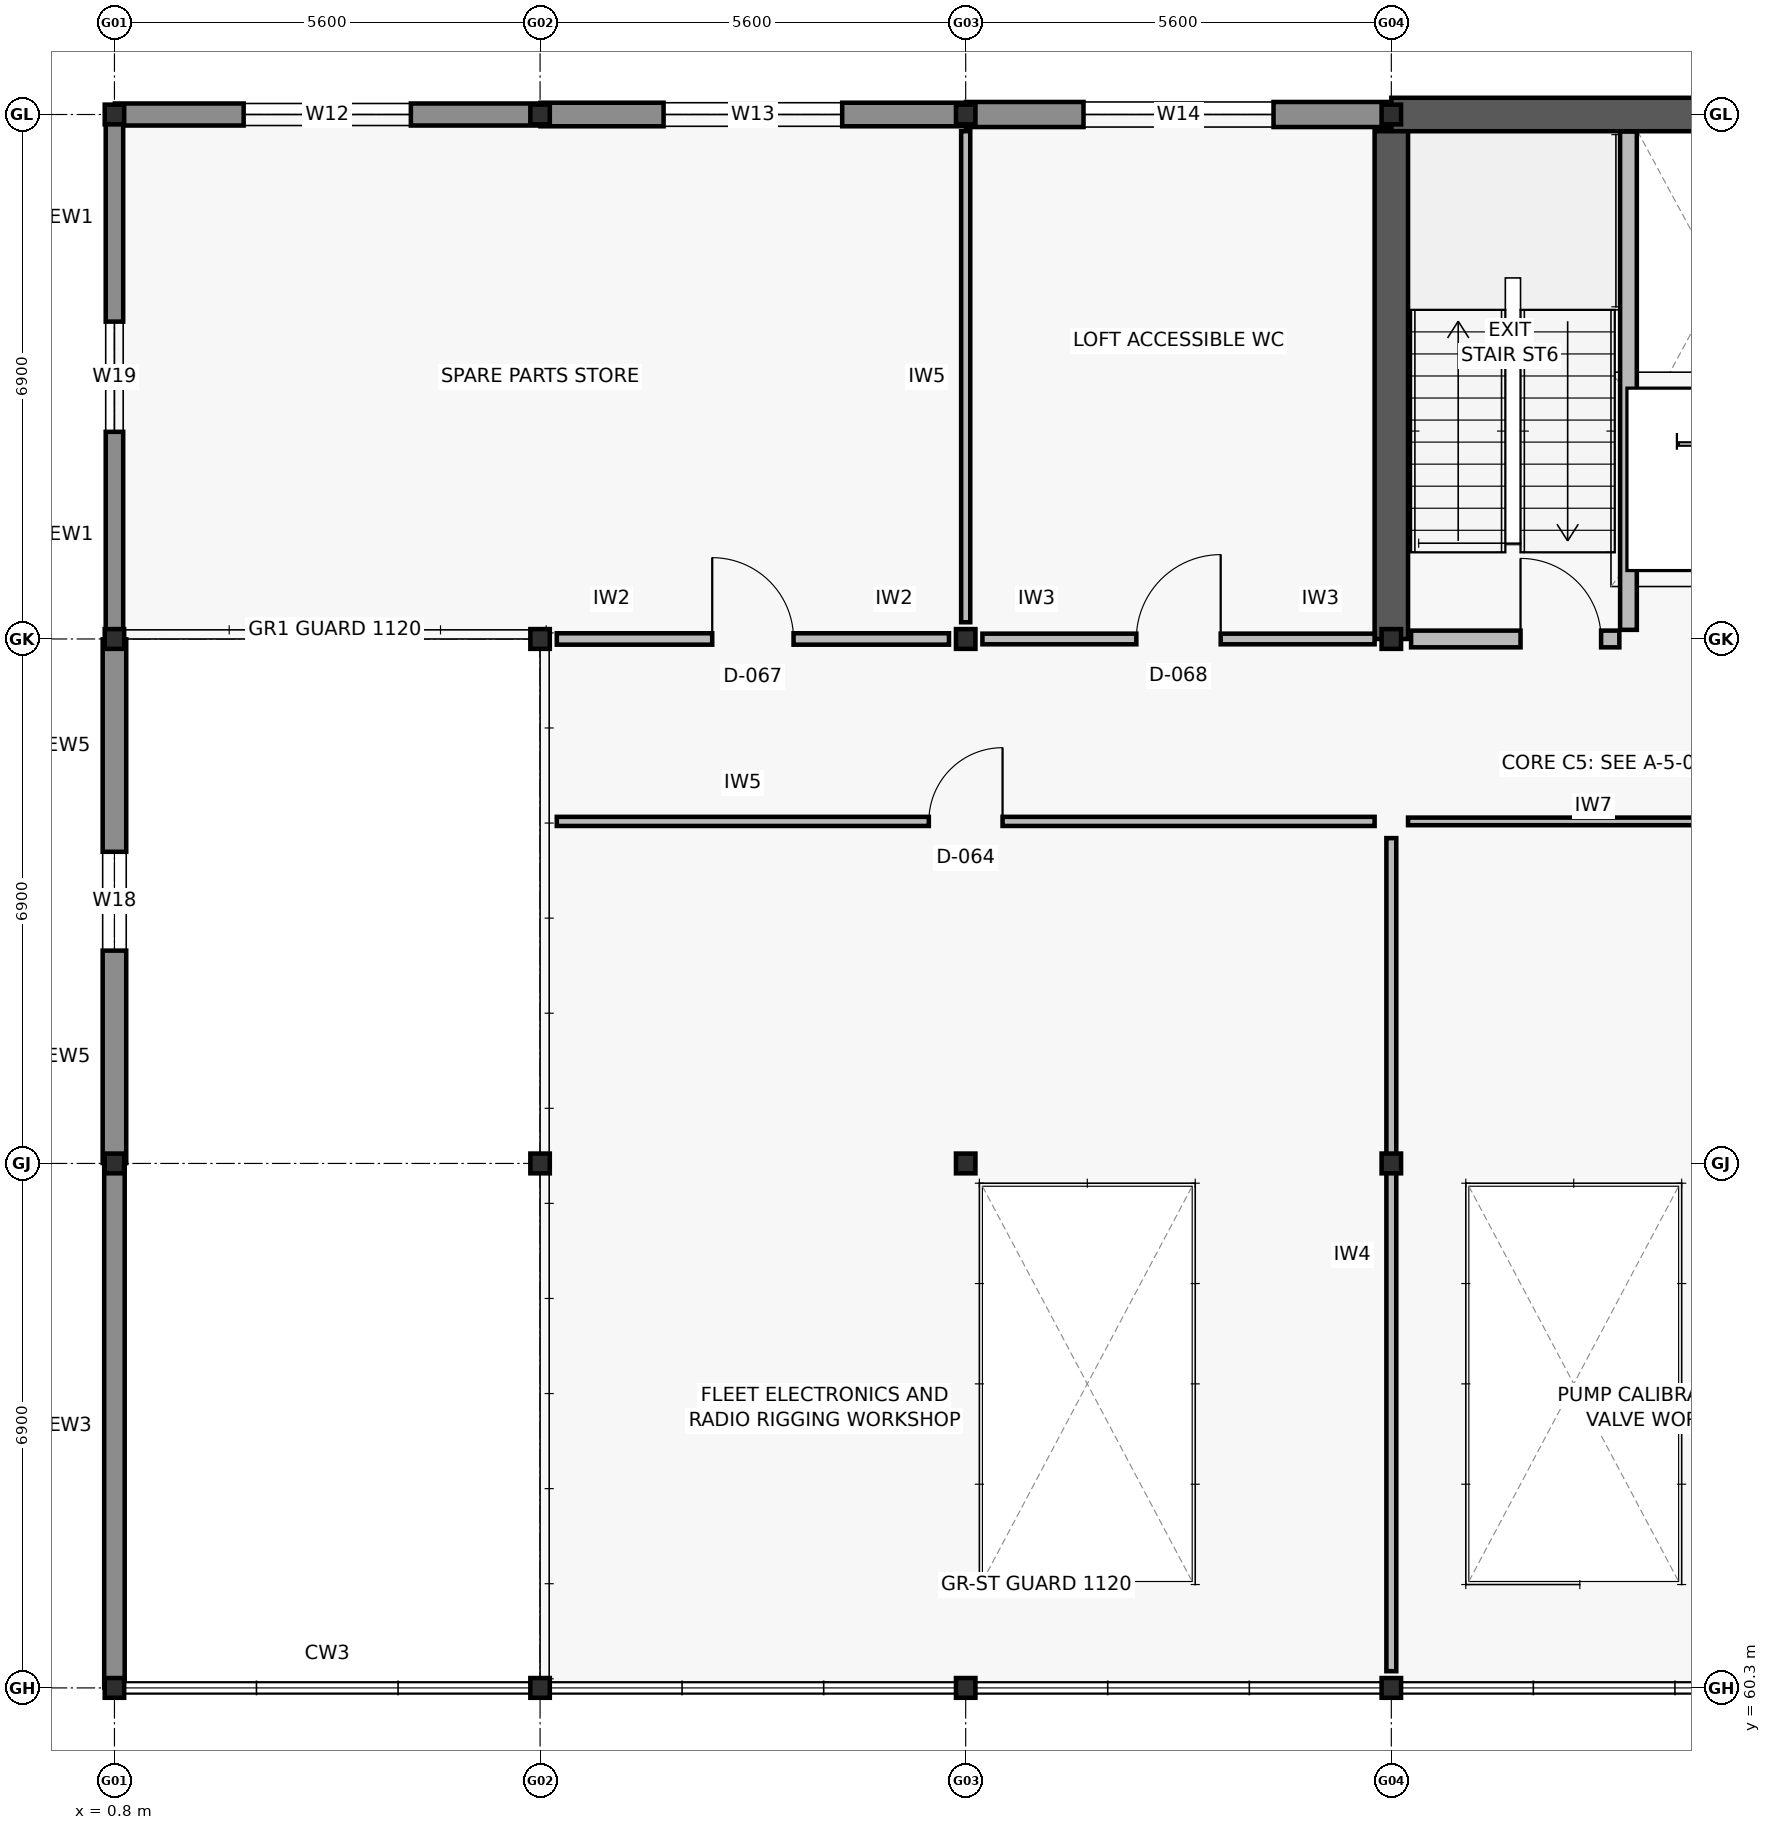
"""IFC4 building model, lengths in metres.
Left out: names, types, materials, properties, quantities, classifications, styles, units other than length and angle.
Written with IfcOpenShell. Run it as: python <this file> out.ifc"""

import sys

from ifc_helpers import new_model, si_unit, direction, frame, frame_2d, origin, origin_2d, place, context, subcontext, project, spatial, rectangle, i_section, extrude, element, fill, save


model = new_model("IFC4")
c1 = context("Model", 3, precision=1e-05, world=origin(), true_north=direction((0.0, 1.0)))
c2 = subcontext(c1, "Body", "Model", "MODEL_VIEW")
j1 = project(units=[si_unit("LENGTHUNIT", "METRE"), si_unit("PLANEANGLEUNIT", "RADIAN")], contexts=[c1])
p1 = place(None, origin())
s1 = spatial("IfcSite", under=j1, at=p1, CompositionType="ELEMENT")
p2 = place(p1, origin())
s2 = spatial("IfcBuilding", under=s1, at=p2, CompositionType="ELEMENT")
p3 = place(p2, frame((0.0, 0.0, 5.4)))
s3 = spatial("IfcBuildingStorey", under=s2, at=p3, CompositionType="ELEMENT", Elevation=5.4)
for number, where, z_axis, x_axis in (
    (1, (0.8, 60.3, 0.0), (0.0, 0.0, 1.0), (1.0, 0.0, 0.0)),
    (2, (0.8, 67.2, 0.0), (0.0, 0.0, 1.0), (1.0, 0.0, 0.0)),
    (3, (0.8, 74.1, 0.0), (0.0, 0.0, 1.0), (1.0, 0.0, 0.0)),
    (4, (0.8, 81.0, 0.0), (0.0, 0.0, 1.0), (1.0, 0.0, 0.0)),
    (5, (6.4, 60.3, 0.0), (0.0, 0.0, 1.0), (1.0, 0.0, 0.0)),
    (6, (6.4, 67.2, 0.0), (0.0, 0.0, 1.0), (1.0, 0.0, 0.0)),
    (7, (6.4, 74.1, 0.0), (0.0, 0.0, 1.0), (1.0, 0.0, 0.0)),
    (8, (6.4, 81.0, 0.0), (0.0, 0.0, 1.0), (1.0, 0.0, 0.0)),
    (9, (12.0, 60.3, 0.0), (0.0, 0.0, 1.0), (1.0, 0.0, 0.0)),
    (10, (12.0, 67.2, 0.0), (0.0, 0.0, 1.0), (1.0, 0.0, 0.0)),
    (11, (12.0, 74.1, 0.0), (0.0, 0.0, 1.0), (1.0, 0.0, 0.0)),
    (12, (12.0, 81.0, 0.0), (0.0, 0.0, 1.0), (1.0, 0.0, 0.0)),
    (13, (17.6, 60.3, 0.0), (0.0, 0.0, 1.0), (1.0, 0.0, 0.0)),
    (14, (17.6, 67.2, 0.0), (0.0, 0.0, 1.0), (1.0, 0.0, 0.0)),
    (15, (17.6, 74.1, 0.0), (0.0, 0.0, 1.0), (1.0, 0.0, 0.0)),
    (16, (17.6, 81.0, 0.0), (0.0, 0.0, 1.0), (1.0, 0.0, 0.0)),
):
    element("IfcColumn", number, at=place(p3, frame(where, z_axis=z_axis, x_axis=x_axis)), inside=s3, PredefinedType="COLUMN", context=c2, shape_type="SweptSolid", body=[
        extrude(i_section(OverallWidth=0.256, OverallDepth=0.26, WebThickness=0.01, FlangeThickness=0.017, FilletRadius=0.013, at=origin_2d()), origin(), (0.0, 0.0, 1.0), 4.2),
    ])
p4 = place(p3, frame((17.6, 81.0, 0.0), z_axis=(0.0, 0.0, 1.0), x_axis=(1.0, 0.0, 0.0)))
e17 = element("IfcWall", 17, at=p4, inside=s3, PredefinedType="SHEAR", context=c2, shape_type="SweptSolid", body=[
    extrude(rectangle(XDim=5.6, YDim=0.44, at=frame_2d((2.8, 0.0))), origin(), (0.0, 0.0, 1.0), 3.96),
])
p5 = place(p3, frame((17.6, 74.1, 0.0), z_axis=(0.0, 0.0, 1.0), x_axis=(0.0, 1.0, 0.0)))
e18 = element("IfcWall", 18, at=p5, inside=s3, PredefinedType="SHEAR", context=c2, shape_type="SweptSolid", body=[
    extrude(rectangle(XDim=6.68, YDim=0.44, at=frame_2d((3.34, 0.0))), origin(), (0.0, 0.0, 1.0), 3.96),
])
p6 = place(p3, frame((0.805, 81.0, 0.0), z_axis=(0.0, 0.0, 1.0), x_axis=(1.0, 0.0, 0.0)))
e19 = element("IfcWall", 19, at=p6, inside=s3, PredefinedType="SOLIDWALL", context=c2, shape_type="SweptSolid", body=[
    extrude(rectangle(XDim=5.59, YDim=0.29, at=frame_2d((2.795, 0.0))), origin(), (0.0, 0.0, 1.0), 3.32),
])
p7 = place(p6, frame((1.695, 0.0, 0.8)))
e20 = element("IfcOpeningElement", 20, at=p7, cuts=e19, PredefinedType="OPENING", context=c2, shape_type="SweptSolid", body=[
    extrude(rectangle(XDim=2.2, YDim=1.8, at=frame_2d((1.1, 0.9))), frame((0.0, 0.155, 0.0), z_axis=(0.0, -1.0, 0.0), x_axis=(1.0, 0.0, 0.0)), (0.0, 0.0, 1.0), 0.31),
])
p8 = place(p3, frame((6.405, 81.0, 0.0), z_axis=(0.0, 0.0, 1.0), x_axis=(1.0, 0.0, 0.0)))
e21 = element("IfcWall", 21, at=p8, inside=s3, PredefinedType="SOLIDWALL", context=c2, shape_type="SweptSolid", body=[
    extrude(rectangle(XDim=5.59, YDim=0.31, at=frame_2d((2.795, 0.0))), origin(), (0.0, 0.0, 1.0), 3.32),
])
p9 = place(p8, frame((1.62, 0.0, 0.8)))
e22 = element("IfcOpeningElement", 22, at=p9, cuts=e21, PredefinedType="OPENING", context=c2, shape_type="SweptSolid", body=[
    extrude(rectangle(XDim=2.35, YDim=1.8, at=frame_2d((1.175, 0.9))), frame((0.0, 0.165, 0.0), z_axis=(0.0, -1.0, 0.0), x_axis=(1.0, 0.0, 0.0)), (0.0, 0.0, 1.0), 0.33),
])
p10 = place(p3, frame((12.005, 81.0, 0.0), z_axis=(0.0, 0.0, 1.0), x_axis=(1.0, 0.0, 0.0)))
e23 = element("IfcWall", 23, at=p10, inside=s3, PredefinedType="SOLIDWALL", context=c2, shape_type="SweptSolid", body=[
    extrude(rectangle(XDim=5.59, YDim=0.33, at=frame_2d((2.795, 0.0))), origin(), (0.0, 0.0, 1.0), 3.32),
])
p11 = place(p10, frame((1.545, 0.0, 0.8)))
e24 = element("IfcOpeningElement", 24, at=p11, cuts=e23, PredefinedType="OPENING", context=c2, shape_type="SweptSolid", body=[
    extrude(rectangle(XDim=2.5, YDim=1.8, at=frame_2d((1.25, 0.9))), frame((0.0, 0.175, 0.0), z_axis=(0.0, -1.0, 0.0), x_axis=(1.0, 0.0, 0.0)), (0.0, 0.0, 1.0), 0.35),
])
p12 = place(p3, frame((0.8, 60.305, 0.0), z_axis=(0.0, 0.0, 1.0), x_axis=(0.0, 1.0, 0.0)))
e25 = element("IfcWall", 25, at=p12, inside=s3, PredefinedType="SOLIDWALL", context=c2, shape_type="SweptSolid", body=[
    extrude(rectangle(XDim=6.89, YDim=0.27, at=frame_2d((3.445, 0.0))), origin(), (0.0, 0.0, 1.0), 3.32),
])
p13 = place(p3, frame((0.8, 67.205, 0.0), z_axis=(0.0, 0.0, 1.0), x_axis=(0.0, 1.0, 0.0)))
e26 = element("IfcWall", 26, at=p13, inside=s3, PredefinedType="SOLIDWALL", context=c2, shape_type="SweptSolid", body=[
    extrude(rectangle(XDim=6.89, YDim=0.31, at=frame_2d((3.445, 0.0))), origin(), (0.0, 0.0, 1.0), 3.32),
])
p14 = place(p13, frame((2.795, 0.0, 0.8)))
e27 = element("IfcOpeningElement", 27, at=p14, cuts=e26, PredefinedType="OPENING", context=c2, shape_type="SweptSolid", body=[
    extrude(rectangle(XDim=1.3, YDim=1.8, at=frame_2d((0.65, 0.9))), frame((0.0, 0.165, 0.0), z_axis=(0.0, -1.0, 0.0), x_axis=(1.0, 0.0, 0.0)), (0.0, 0.0, 1.0), 0.33),
])
p15 = place(p3, frame((0.8, 74.105, 0.0), z_axis=(0.0, 0.0, 1.0), x_axis=(0.0, 1.0, 0.0)))
e28 = element("IfcWall", 28, at=p15, inside=s3, PredefinedType="SOLIDWALL", context=c2, shape_type="SweptSolid", body=[
    extrude(rectangle(XDim=6.89, YDim=0.23, at=frame_2d((3.445, 0.0))), origin(), (0.0, 0.0, 1.0), 3.32),
])
p16 = place(p15, frame((2.72, 0.0, 0.8)))
e29 = element("IfcOpeningElement", 29, at=p16, cuts=e28, PredefinedType="OPENING", context=c2, shape_type="SweptSolid", body=[
    extrude(rectangle(XDim=1.45, YDim=1.8, at=frame_2d((0.725, 0.9))), frame((0.0, 0.125, 0.0), z_axis=(0.0, -1.0, 0.0), x_axis=(1.0, 0.0, 0.0)), (0.0, 0.0, 1.0), 0.25),
])
p17 = place(p3, frame((20.72, 74.22, 0.0), z_axis=(0.0, 0.0, 1.0), x_axis=(0.0, 1.0, 0.0)))
e30 = element("IfcWall", 30, at=p17, inside=s3, PredefinedType="SOLIDWALL", context=c2, shape_type="SweptSolid", body=[
    extrude(rectangle(XDim=6.555, YDim=0.22, at=frame_2d((3.277, 0.0))), origin(), (0.0, 0.0, 1.0), 3.96),
])
p18 = place(p3, frame((17.86, 74.1, 0.0), z_axis=(0.0, 0.0, 1.0), x_axis=(1.0, 0.0, 0.0)))
e31 = element("IfcWall", 31, at=p18, inside=s3, PredefinedType="SOLIDWALL", context=c2, shape_type="SweptSolid", body=[
    extrude(rectangle(XDim=2.74, YDim=0.22, at=frame_2d((1.37, 0.0))), origin(), (0.0, 0.0, 1.0), 3.32),
])
p19 = place(p18, frame((1.44, 0.0, 0.0)))
e32 = element("IfcOpeningElement", 32, at=p19, cuts=e31, PredefinedType="OPENING", context=c2, shape_type="SweptSolid", body=[
    extrude(rectangle(XDim=1.06, YDim=2.1, at=frame_2d((0.53, 1.05))), frame((0.0, 0.12, 0.0), z_axis=(0.0, -1.0, 0.0), x_axis=(1.0, 0.0, 0.0)), (0.0, 0.0, 1.0), 0.24),
])
p20 = place(p3, frame((20.84, 76.7, 0.0), z_axis=(0.0, 0.0, 1.0), x_axis=(1.0, 0.0, 0.0)))
e33 = element("IfcWall", 33, at=p20, inside=s3, PredefinedType="SOLIDWALL", context=c2, shape_type="SweptSolid", body=[
    extrude(rectangle(XDim=2.135, YDim=0.22, at=frame_2d((1.067, 0.0))), origin(), (0.0, 0.0, 1.0), 3.96),
])
p21 = place(p20, frame((0.518, 0.0, 0.0)))
e34 = element("IfcOpeningElement", 34, at=p21, cuts=e33, PredefinedType="OPENING", context=c2, shape_type="SweptSolid", body=[
    extrude(rectangle(XDim=1.1, YDim=2.1, at=frame_2d((0.55, 1.05))), frame((0.0, 0.12, 0.0), z_axis=(0.0, -1.0, 0.0), x_axis=(1.0, 0.0, 0.0)), (0.0, 0.0, 1.0), 0.24),
])
p22 = place(p3, frame((17.6, 60.52, 0.0), z_axis=(0.0, 0.0, 1.0), x_axis=(0.0, 1.0, 0.0)))
e35 = element("IfcWall", 35, at=p22, inside=s3, PredefinedType="PARTITIONING", context=c2, shape_type="SweptSolid", body=[
    extrude(rectangle(XDim=10.96, YDim=0.13, at=frame_2d((5.48, 0.0))), origin(), (0.0, 0.0, 1.0), 3.3),
])
p23 = place(p3, frame((6.62, 71.7, 0.0), z_axis=(0.0, 0.0, 1.0), x_axis=(1.0, 0.0, 0.0)))
e36 = element("IfcWall", 36, at=p23, inside=s3, PredefinedType="PARTITIONING", context=c2, shape_type="SweptSolid", body=[
    extrude(rectangle(XDim=10.76, YDim=0.12, at=frame_2d((5.38, 0.0))), origin(), (0.0, 0.0, 1.0), 3.3),
])
p24 = place(p23, frame((4.895, 0.0, 0.0)))
e37 = element("IfcOpeningElement", 37, at=p24, cuts=e36, PredefinedType="OPENING", context=c2, shape_type="SweptSolid", body=[
    extrude(rectangle(XDim=0.97, YDim=2.1, at=frame_2d((0.485, 1.05))), frame((0.0, 0.07, 0.0), z_axis=(0.0, -1.0, 0.0), x_axis=(1.0, 0.0, 0.0)), (0.0, 0.0, 1.0), 0.14),
])
p25 = place(p3, frame((17.82, 71.7, 0.0), z_axis=(0.0, 0.0, 1.0), x_axis=(1.0, 0.0, 0.0)))
e38 = element("IfcWall", 38, at=p25, inside=s3, PredefinedType="PARTITIONING", context=c2, shape_type="SweptSolid", body=[
    extrude(rectangle(XDim=10.76, YDim=0.1, at=frame_2d((5.38, 0.0))), origin(), (0.0, 0.0, 1.0), 3.3),
])
p26 = place(p25, frame((4.88, 0.0, 0.0)))
e39 = element("IfcOpeningElement", 39, at=p26, cuts=e38, PredefinedType="OPENING", context=c2, shape_type="SweptSolid", body=[
    extrude(rectangle(XDim=1.0, YDim=2.12, at=frame_2d((0.5, 1.06))), frame((0.0, 0.06, 0.0), z_axis=(0.0, -1.0, 0.0), x_axis=(1.0, 0.0, 0.0)), (0.0, 0.0, 1.0), 0.12),
])
p27 = place(p3, frame((6.62, 74.1, 0.0), z_axis=(0.0, 0.0, 1.0), x_axis=(1.0, 0.0, 0.0)))
e40 = element("IfcWall", 40, at=p27, inside=s3, PredefinedType="PARTITIONING", context=c2, shape_type="SweptSolid", body=[
    extrude(rectangle(XDim=5.16, YDim=0.15, at=frame_2d((2.58, 0.0))), origin(), (0.0, 0.0, 1.0), 3.3),
])
p28 = place(p27, frame((2.045, 0.0, 0.0)))
e41 = element("IfcOpeningElement", 41, at=p28, cuts=e40, PredefinedType="OPENING", context=c2, shape_type="SweptSolid", body=[
    extrude(rectangle(XDim=1.07, YDim=2.08, at=frame_2d((0.535, 1.04))), frame((0.0, 0.085, 0.0), z_axis=(0.0, -1.0, 0.0), x_axis=(1.0, 0.0, 0.0)), (0.0, 0.0, 1.0), 0.17),
])
p29 = place(p3, frame((12.22, 74.1, 0.0), z_axis=(0.0, 0.0, 1.0), x_axis=(1.0, 0.0, 0.0)))
e42 = element("IfcWall", 42, at=p29, inside=s3, PredefinedType="PARTITIONING", context=c2, shape_type="SweptSolid", body=[
    extrude(rectangle(XDim=5.16, YDim=0.14, at=frame_2d((2.58, 0.0))), origin(), (0.0, 0.0, 1.0), 3.3),
])
p30 = place(p29, frame((2.025, 0.0, 0.0)))
e43 = element("IfcOpeningElement", 43, at=p30, cuts=e42, PredefinedType="OPENING", context=c2, shape_type="SweptSolid", body=[
    extrude(rectangle(XDim=1.11, YDim=2.1, at=frame_2d((0.555, 1.05))), frame((0.0, 0.08, 0.0), z_axis=(0.0, -1.0, 0.0), x_axis=(1.0, 0.0, 0.0)), (0.0, 0.0, 1.0), 0.16),
])
p31 = place(p3, frame((12.0, 74.32, 0.0), z_axis=(0.0, 0.0, 1.0), x_axis=(0.0, 1.0, 0.0)))
e44 = element("IfcWall", 44, at=p31, inside=s3, PredefinedType="PARTITIONING", context=c2, shape_type="SweptSolid", body=[
    extrude(rectangle(XDim=6.46, YDim=0.12, at=frame_2d((3.23, 0.0))), origin(), (0.0, 0.0, 1.0), 3.3),
])
p32 = place(p7, origin())
e45 = element("IfcWindow", 45, at=p32, inside=s3, PartitioningType="DOUBLE_PANEL_VERTICAL", PredefinedType="WINDOW", context=c2, shape_type="SweptSolid", body=[
    extrude(rectangle(XDim=2.2, YDim=1.8, at=frame_2d((1.1, 0.9))), frame((0.0, 0.03, 0.0), z_axis=(0.0, -1.0, 0.0), x_axis=(1.0, 0.0, 0.0)), (0.0, 0.0, 1.0), 0.06),
])
fill(e20, e45)
p33 = place(p9, origin())
e46 = element("IfcWindow", 46, at=p33, inside=s3, PartitioningType="DOUBLE_PANEL_VERTICAL", PredefinedType="WINDOW", context=c2, shape_type="SweptSolid", body=[
    extrude(rectangle(XDim=2.35, YDim=1.8, at=frame_2d((1.175, 0.9))), frame((0.0, 0.03, 0.0), z_axis=(0.0, -1.0, 0.0), x_axis=(1.0, 0.0, 0.0)), (0.0, 0.0, 1.0), 0.06),
])
fill(e22, e46)
p34 = place(p11, origin())
e47 = element("IfcWindow", 47, at=p34, inside=s3, PartitioningType="TRIPLE_PANEL_VERTICAL", PredefinedType="WINDOW", context=c2, shape_type="SweptSolid", body=[
    extrude(rectangle(XDim=2.5, YDim=1.8, at=frame_2d((1.25, 0.9))), frame((0.0, 0.03, 0.0), z_axis=(0.0, -1.0, 0.0), x_axis=(1.0, 0.0, 0.0)), (0.0, 0.0, 1.0), 0.06),
])
fill(e24, e47)
p35 = place(p14, origin())
e48 = element("IfcWindow", 48, at=p35, inside=s3, PartitioningType="SINGLE_PANEL", PredefinedType="WINDOW", context=c2, shape_type="SweptSolid", body=[
    extrude(rectangle(XDim=1.3, YDim=1.8, at=frame_2d((0.65, 0.9))), frame((0.0, 0.03, 0.0), z_axis=(0.0, -1.0, 0.0), x_axis=(1.0, 0.0, 0.0)), (0.0, 0.0, 1.0), 0.06),
])
fill(e27, e48)
p36 = place(p16, origin())
e49 = element("IfcWindow", 49, at=p36, inside=s3, PartitioningType="SINGLE_PANEL", PredefinedType="WINDOW", context=c2, shape_type="SweptSolid", body=[
    extrude(rectangle(XDim=1.45, YDim=1.8, at=frame_2d((0.725, 0.9))), frame((0.0, 0.03, 0.0), z_axis=(0.0, -1.0, 0.0), x_axis=(1.0, 0.0, 0.0)), (0.0, 0.0, 1.0), 0.06),
])
fill(e29, e49)
p37 = place(p19, origin())
e50 = element("IfcDoor", 50, at=p37, inside=s3, OperationType="SINGLE_SWING_LEFT", PredefinedType="DOOR", context=c2, shape_type="SweptSolid", body=[
    extrude(rectangle(XDim=1.06, YDim=2.1, at=frame_2d((0.53, 1.05))), frame((0.0, 0.025, 0.0), z_axis=(0.0, -1.0, 0.0), x_axis=(1.0, 0.0, 0.0)), (0.0, 0.0, 1.0), 0.05),
])
fill(e32, e50)
p38 = place(p21, origin())
e51 = element("IfcDoor", 51, at=p38, inside=s3, OperationType="DOUBLE_DOOR_SLIDING", PredefinedType="DOOR", context=c2, shape_type="SweptSolid", body=[
    extrude(rectangle(XDim=1.1, YDim=2.1, at=frame_2d((0.55, 1.05))), frame((0.0, 0.025, 0.0), z_axis=(0.0, -1.0, 0.0), x_axis=(1.0, 0.0, 0.0)), (0.0, 0.0, 1.0), 0.05),
])
fill(e34, e51)
p39 = place(p24, origin())
e52 = element("IfcDoor", 52, at=p39, inside=s3, OperationType="SINGLE_SWING_RIGHT", PredefinedType="DOOR", context=c2, shape_type="SweptSolid", body=[
    extrude(rectangle(XDim=0.97, YDim=2.1, at=frame_2d((0.485, 1.05))), frame((0.0, 0.025, 0.0), z_axis=(0.0, -1.0, 0.0), x_axis=(1.0, 0.0, 0.0)), (0.0, 0.0, 1.0), 0.05),
])
fill(e37, e52)
p40 = place(p28, origin())
e53 = element("IfcDoor", 53, at=p40, inside=s3, OperationType="SINGLE_SWING_LEFT", PredefinedType="DOOR", context=c2, shape_type="SweptSolid", body=[
    extrude(rectangle(XDim=1.07, YDim=2.08, at=frame_2d((0.535, 1.04))), frame((0.0, 0.025, 0.0), z_axis=(0.0, -1.0, 0.0), x_axis=(1.0, 0.0, 0.0)), (0.0, 0.0, 1.0), 0.05),
])
fill(e41, e53)
p41 = place(p30, origin())
e54 = element("IfcDoor", 54, at=p41, inside=s3, OperationType="SINGLE_SWING_RIGHT", PredefinedType="DOOR", context=c2, shape_type="SweptSolid", body=[
    extrude(rectangle(XDim=1.11, YDim=2.1, at=frame_2d((0.555, 1.05))), frame((0.0, 0.025, 0.0), z_axis=(0.0, -1.0, 0.0), x_axis=(1.0, 0.0, 0.0)), (0.0, 0.0, 1.0), 0.05),
])
fill(e43, e54)
save(model, sys.argv[1])
